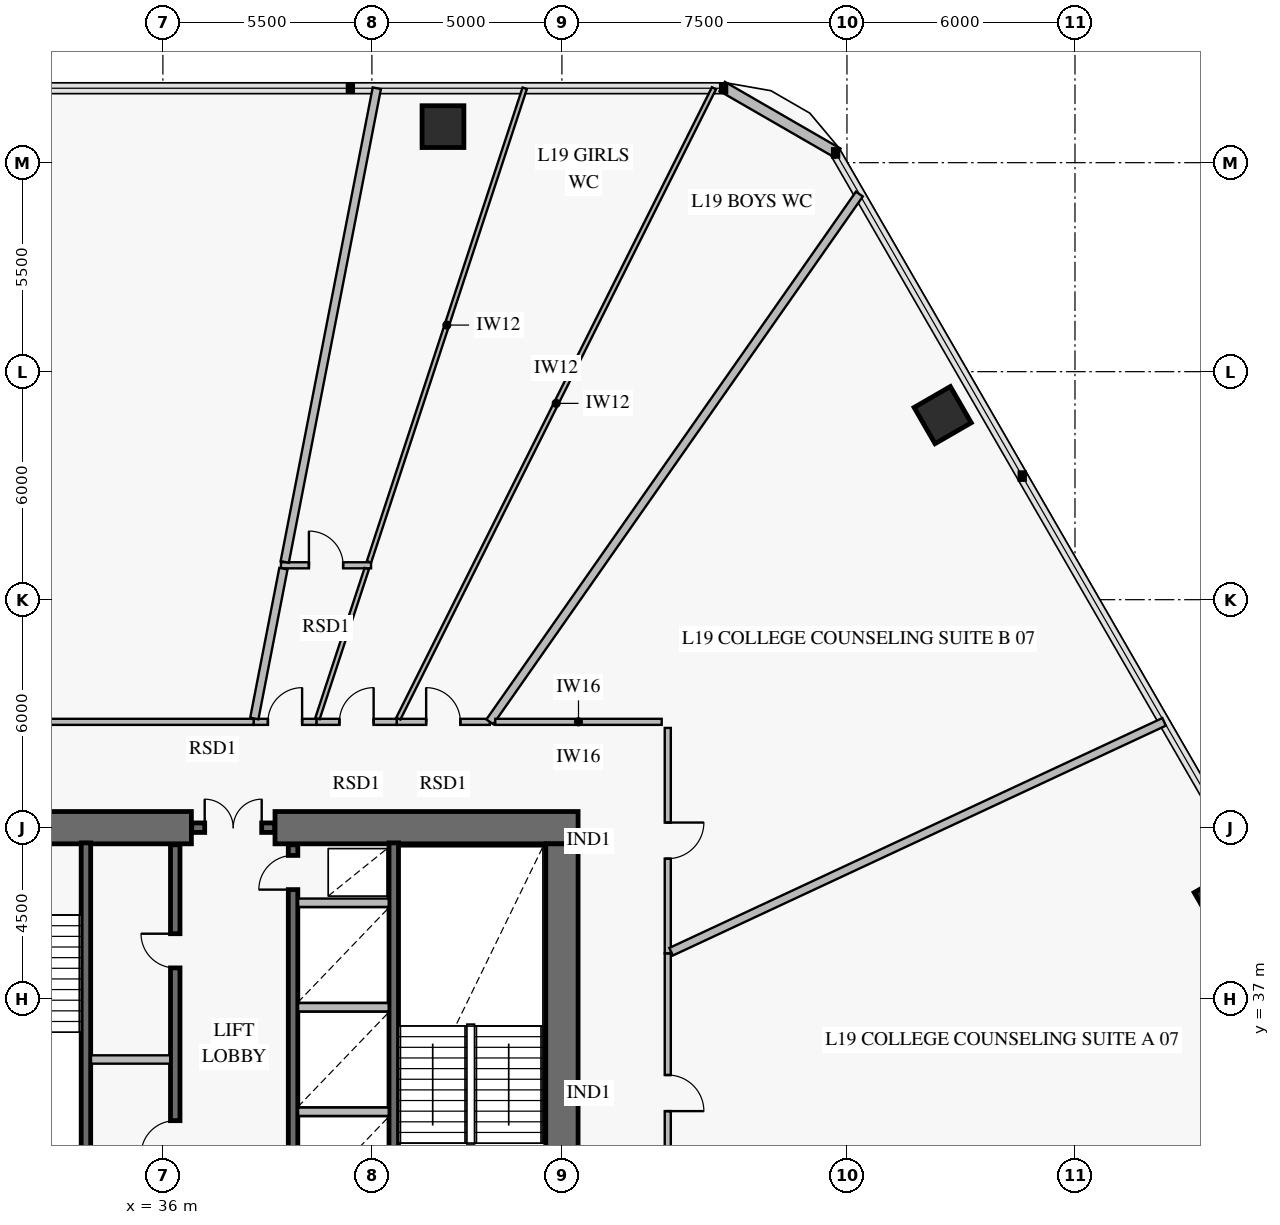
"""IFC4 building model, lengths in metres.
Left out: names, types, materials, properties, quantities, classifications, styles, units other than length and angle.
Written with IfcOpenShell. Run it as: python <this file> out.ifc"""

import sys

from ifc_helpers import new_model, si_unit, direction, frame, frame_2d, origin, origin_2d, place, context, subcontext, project, spatial, rectangle, extrude, element, fill, save


model = new_model("IFC4")
c1 = context("Model", 3, precision=1e-05, world=origin(), true_north=direction((0.0, 1.0)))
c2 = subcontext(c1, "Body", "Model", "MODEL_VIEW")
j1 = project(units=[si_unit("LENGTHUNIT", "METRE"), si_unit("PLANEANGLEUNIT", "RADIAN")], contexts=[c1])
p1 = place(None, origin())
s1 = spatial("IfcSite", under=j1, at=p1, CompositionType="ELEMENT")
p2 = place(p1, origin())
s2 = spatial("IfcBuilding", under=s1, at=p2, CompositionType="ELEMENT")
p3 = place(p2, frame((0.0, 0.0, 79.2)))
s3 = spatial("IfcBuildingStorey", under=s2, at=p3, CompositionType="ELEMENT", Elevation=79.2)
p4 = place(p3, frame((46.925, 41.5, 0.0), z_axis=(0.0, 0.0, 1.0), x_axis=(-1.0, 0.0, 0.0)))
e1 = element("IfcWall", 1, at=p4, inside=s3, PredefinedType="SHEAR", context=c2, shape_type="SweptSolid", body=[
    extrude(rectangle(XDim=7.975, YDim=0.85, at=frame_2d((3.988, 0.0))), origin(), (0.0, 0.0, 1.0), 4.2),
])
p5 = place(p3, frame((36.75, 41.5, 0.0), z_axis=(0.0, 0.0, 1.0), x_axis=(-1.0, 0.0, 0.0)))
e2 = element("IfcWall", 2, at=p5, inside=s3, PredefinedType="SHEAR", context=c2, shape_type="SweptSolid", body=[
    extrude(rectangle(XDim=11.675, YDim=0.85, at=frame_2d((5.837, 0.0))), origin(), (0.0, 0.0, 1.0), 4.2),
])
p6 = place(p5, frame((4.25, 0.0, 0.0)))
e3 = element("IfcOpeningElement", 3, at=p6, cuts=e2, PredefinedType="OPENING", context=c2, shape_type="SweptSolid", body=[
    extrude(rectangle(XDim=1.1, YDim=2.15, at=frame_2d((0.55, 1.075))), frame((0.0, 0.437, 0.0), z_axis=(0.0, -1.0, 0.0), x_axis=(1.0, 0.0, 0.0)), (0.0, 0.0, 1.0), 0.874),
])
p7 = place(p3, frame((46.5, 22.925, 0.0), z_axis=(0.0, 0.0, 1.0), x_axis=(0.0, 1.0, 0.0)))
e4 = element("IfcWall", 4, at=p7, inside=s3, PredefinedType="SHEAR", context=c2, shape_type="SweptSolid", body=[
    extrude(rectangle(XDim=18.15, YDim=0.85, at=frame_2d((9.075, 0.0))), origin(), (0.0, 0.0, 1.0), 4.2),
])
p8 = place(p7, frame((8.825, 0.0, 0.0)))
e5 = element("IfcOpeningElement", 5, at=p8, cuts=e4, PredefinedType="OPENING", context=c2, shape_type="SweptSolid", body=[
    extrude(rectangle(XDim=1.1, YDim=2.15, at=frame_2d((0.55, 1.075))), frame((0.0, 0.437, 0.0), z_axis=(0.0, -1.0, 0.0), x_axis=(1.0, 0.0, 0.0)), (0.0, 0.0, 1.0), 0.874),
])
for number, where, z_axis, x_axis in (
    (6, (63.889, 39.592, 0.0), (0.0, 0.0, 1.0), (-0.5, 0.866, 0.0)),
    (7, (56.519, 52.357, 0.0), (0.0, 0.0, 1.0), (-0.5, 0.866, 0.0)),
    (8, (43.37, 59.948, 0.0), (0.0, 0.0, 1.0), (-1.0, 0.0, 0.0)),
):
    element("IfcColumn", number, at=place(p3, frame(where, z_axis=z_axis, x_axis=x_axis)), inside=s3, PredefinedType="COLUMN", context=c2, shape_type="SweptSolid", body=[
        extrude(rectangle(XDim=1.1, YDim=1.1, at=origin_2d()), origin(), (0.0, 0.0, 1.0), 3.92),
    ])
p9 = place(p3, frame((50.717, 61.006, 0.0), z_axis=(0.0, 0.0, 1.0), x_axis=(0.866007452331, -0.500031091541, 0.0)))
e9 = element("IfcWall", 9, at=p9, inside=s3, PredefinedType="SOLIDWALL", context=c2, shape_type="SweptSolid", body=[
    extrude(rectangle(XDim=3.515, YDim=0.28, at=frame_2d((1.757, 0.0))), origin(), (0.0, 0.0, 1.0), 3.92),
])
p10 = place(p3, frame((36.76, 41.5, 0.0), z_axis=(0.0, 0.0, 1.0), x_axis=(1.0, 0.0, 0.0)))
e10 = element("IfcWall", 10, at=p10, inside=s3, PredefinedType="SOLIDWALL", context=c2, shape_type="SweptSolid", body=[
    extrude(rectangle(XDim=2.18, YDim=0.25, at=frame_2d((1.09, 0.0))), origin(), (0.0, 0.0, 1.0), 4.2),
])
p11 = place(p10, frame((0.34, 0.0, 0.0)))
e11 = element("IfcOpeningElement", 11, at=p11, cuts=e10, PredefinedType="OPENING", context=c2, shape_type="SweptSolid", body=[
    extrude(rectangle(XDim=1.5, YDim=2.15, at=frame_2d((0.75, 1.075))), frame((0.0, 0.137, 0.0), z_axis=(0.0, -1.0, 0.0), x_axis=(1.0, 0.0, 0.0)), (0.0, 0.0, 1.0), 0.274),
])
for number, where, z_axis, x_axis in (
    (12, (33.975, 31.4, 0.0), (0.0, 0.0, 1.0), (0.0, 1.0, 0.0)),
    (13, (42.075, 31.4, 0.0), (0.0, 0.0, 1.0), (0.0, 1.0, 0.0)),
):
    element("IfcWall", number, at=place(p3, frame(where, z_axis=z_axis, x_axis=x_axis)), inside=s3, PredefinedType="SOLIDWALL", context=c2, shape_type="SweptSolid", body=[
        extrude(rectangle(XDim=9.7, YDim=0.25, at=frame_2d((4.85, 0.0))), origin(), (0.0, 0.0, 1.0), 4.2),
    ])
p12 = place(p3, frame((36.325, 31.4, 0.0), z_axis=(0.0, 0.0, 1.0), x_axis=(0.0, 1.0, 0.0)))
e14 = element("IfcWall", 14, at=p12, inside=s3, PredefinedType="SOLIDWALL", context=c2, shape_type="SweptSolid", body=[
    extrude(rectangle(XDim=9.65, YDim=0.25, at=frame_2d((4.825, 0.0))), origin(), (0.0, 0.0, 1.0), 4.2),
])
p13 = place(p12, frame((1.49, 0.0, 0.0)))
e15 = element("IfcOpeningElement", 15, at=p13, cuts=e14, PredefinedType="OPENING", context=c2, shape_type="SweptSolid", body=[
    extrude(rectangle(XDim=0.9, YDim=2.1, at=frame_2d((0.45, 1.05))), frame((0.0, 0.137, 0.0), z_axis=(0.0, -1.0, 0.0), x_axis=(1.0, 0.0, 0.0)), (0.0, 0.0, 1.0), 0.274),
])
p14 = place(p12, frame((6.41, 0.0, 0.0)))
e16 = element("IfcOpeningElement", 16, at=p14, cuts=e14, PredefinedType="OPENING", context=c2, shape_type="SweptSolid", body=[
    extrude(rectangle(XDim=0.9, YDim=2.1, at=frame_2d((0.45, 1.05))), frame((0.0, 0.137, 0.0), z_axis=(0.0, -1.0, 0.0), x_axis=(1.0, 0.0, 0.0)), (0.0, 0.0, 1.0), 0.274),
])
p15 = place(p3, frame((39.425, 31.4, 0.0), z_axis=(0.0, 0.0, 1.0), x_axis=(0.0, 1.0, 0.0)))
e17 = element("IfcWall", 17, at=p15, inside=s3, PredefinedType="SOLIDWALL", context=c2, shape_type="SweptSolid", body=[
    extrude(rectangle(XDim=9.65, YDim=0.25, at=frame_2d((4.825, 0.0))), origin(), (0.0, 0.0, 1.0), 4.2),
])
p16 = place(p15, frame((8.47, 0.0, 0.0)))
e18 = element("IfcOpeningElement", 18, at=p16, cuts=e17, PredefinedType="OPENING", context=c2, shape_type="SweptSolid", body=[
    extrude(rectangle(XDim=0.9, YDim=2.1, at=frame_2d((0.45, 1.05))), frame((0.0, 0.137, 0.0), z_axis=(0.0, -1.0, 0.0), x_axis=(1.0, 0.0, 0.0)), (0.0, 0.0, 1.0), 0.274),
])
p17 = place(p3, frame((44.602, 44.285, 0.0), z_axis=(0.0, 0.0, 1.0), x_axis=(-1.0, 0.0, 0.0)))
e19 = element("IfcWall", 19, at=p17, inside=s3, PredefinedType="PARTITIONING", context=c2, shape_type="SweptSolid", body=[
    extrude(rectangle(XDim=2.45, YDim=0.16, at=frame_2d((1.225, 0.0))), origin(), (0.0, 0.0, 1.0), 3.92),
])
p18 = place(p17, frame((0.775, 0.0, 0.0)))
e20 = element("IfcOpeningElement", 20, at=p18, cuts=e19, PredefinedType="OPENING", context=c2, shape_type="SweptSolid", body=[
    extrude(rectangle(XDim=0.9, YDim=2.1, at=frame_2d((0.45, 1.05))), frame((0.0, 0.092, 0.0), z_axis=(0.0, -1.0, 0.0), x_axis=(1.0, 0.0, 0.0)), (0.0, 0.0, 1.0), 0.184),
])
p19 = place(p3, frame((42.152, 44.285, 0.0), z_axis=(0.0, 0.0, 1.0), x_axis=(-1.0, 0.0, 0.0)))
e21 = element("IfcWall", 21, at=p19, inside=s3, PredefinedType="PARTITIONING", context=c2, shape_type="SweptSolid", body=[
    extrude(rectangle(XDim=2.113, YDim=0.16, at=frame_2d((1.056, 0.0))), origin(), (0.0, 0.0, 1.0), 3.92),
])
p20 = place(p19, frame((0.606, 0.0, 0.0)))
e22 = element("IfcOpeningElement", 22, at=p20, cuts=e21, PredefinedType="OPENING", context=c2, shape_type="SweptSolid", body=[
    extrude(rectangle(XDim=0.9, YDim=2.1, at=frame_2d((0.45, 1.05))), frame((0.0, 0.092, 0.0), z_axis=(0.0, -1.0, 0.0), x_axis=(1.0, 0.0, 0.0)), (0.0, 0.0, 1.0), 0.184),
])
p21 = place(p3, frame((39.107, 48.405, 0.0), z_axis=(0.0, 0.0, 1.0), x_axis=(1.0, 0.0, 0.0)))
e23 = element("IfcWall", 23, at=p21, inside=s3, PredefinedType="PARTITIONING", context=c2, shape_type="SweptSolid", body=[
    extrude(rectangle(XDim=2.37, YDim=0.16, at=frame_2d((1.185, 0.0))), origin(), (0.0, 0.0, 1.0), 3.22),
])
p22 = place(p21, frame((0.735, 0.0, 0.0)))
e24 = element("IfcOpeningElement", 24, at=p22, cuts=e23, PredefinedType="OPENING", context=c2, shape_type="SweptSolid", body=[
    extrude(rectangle(XDim=0.9, YDim=2.1, at=frame_2d((0.45, 1.05))), frame((0.0, 0.092, 0.0), z_axis=(0.0, -1.0, 0.0), x_axis=(1.0, 0.0, 0.0)), (0.0, 0.0, 1.0), 0.184),
])
p23 = place(p3, frame((40.039, 44.285, 0.0), z_axis=(0.0, 0.0, 1.0), x_axis=(-1.0, 0.0, 0.0)))
e25 = element("IfcWall", 25, at=p23, inside=s3, PredefinedType="PARTITIONING", context=c2, shape_type="SweptSolid", body=[
    extrude(rectangle(XDim=1.651, YDim=0.16, at=frame_2d((0.826, 0.0))), origin(), (0.0, 0.0, 1.0), 3.22),
])
p24 = place(p23, frame((0.375, 0.0, 0.0)))
e26 = element("IfcOpeningElement", 26, at=p24, cuts=e25, PredefinedType="OPENING", context=c2, shape_type="SweptSolid", body=[
    extrude(rectangle(XDim=0.9, YDim=2.1, at=frame_2d((0.45, 1.05))), frame((0.0, 0.092, 0.0), z_axis=(0.0, -1.0, 0.0), x_axis=(1.0, 0.0, 0.0)), (0.0, 0.0, 1.0), 0.184),
])
p25 = place(p3, frame((38.388, 44.285, 0.0), z_axis=(0.0, 0.0, 1.0), x_axis=(-1.0, 0.0, 0.0)))
e27 = element("IfcWall", 27, at=p25, inside=s3, PredefinedType="PARTITIONING", context=c2, shape_type="SweptSolid", body=[
    extrude(rectangle(XDim=13.844, YDim=0.16, at=frame_2d((6.922, 0.0))), origin(), (0.0, 0.0, 1.0), 3.22),
])
p26 = place(p25, frame((6.347, 0.0, 0.0)))
e28 = element("IfcOpeningElement", 28, at=p26, cuts=e27, PredefinedType="OPENING", context=c2, shape_type="SweptSolid", body=[
    extrude(rectangle(XDim=1.15, YDim=2.2, at=frame_2d((0.575, 1.1))), frame((0.0, 0.092, 0.0), z_axis=(0.0, -1.0, 0.0), x_axis=(1.0, 0.0, 0.0)), (0.0, 0.0, 1.0), 0.184),
])
p27 = place(p3, frame((49.285, 30.838, 0.0), z_axis=(0.0, 0.0, 1.0), x_axis=(0.0, 1.0, 0.0)))
e29 = element("IfcWall", 29, at=p27, inside=s3, PredefinedType="PARTITIONING", context=c2, shape_type="SweptSolid", body=[
    extrude(rectangle(XDim=7.357, YDim=0.16, at=frame_2d((3.679, 0.0))), origin(), (0.0, 0.0, 1.0), 3.22),
])
p28 = place(p27, frame((3.204, 0.0, 0.0)))
e30 = element("IfcOpeningElement", 30, at=p28, cuts=e29, PredefinedType="OPENING", context=c2, shape_type="SweptSolid", body=[
    extrude(rectangle(XDim=0.95, YDim=2.1, at=frame_2d((0.475, 1.05))), frame((0.0, 0.092, 0.0), z_axis=(0.0, -1.0, 0.0), x_axis=(1.0, 0.0, 0.0)), (0.0, 0.0, 1.0), 0.184),
])
p29 = place(p3, frame((49.285, 38.195, 0.0), z_axis=(0.0, 0.0, 1.0), x_axis=(0.0, 1.0, 0.0)))
e31 = element("IfcWall", 31, at=p29, inside=s3, PredefinedType="PARTITIONING", context=c2, shape_type="SweptSolid", body=[
    extrude(rectangle(XDim=5.93, YDim=0.16, at=frame_2d((2.965, 0.0))), origin(), (0.0, 0.0, 1.0), 3.92),
])
p30 = place(p29, frame((2.49, 0.0, 0.0)))
e32 = element("IfcOpeningElement", 32, at=p30, cuts=e31, PredefinedType="OPENING", context=c2, shape_type="SweptSolid", body=[
    extrude(rectangle(XDim=0.95, YDim=2.1, at=frame_2d((0.475, 1.05))), frame((0.0, 0.092, 0.0), z_axis=(0.0, -1.0, 0.0), x_axis=(1.0, 0.0, 0.0)), (0.0, 0.0, 1.0), 0.184),
])
p31 = place(p3, frame((34.108, 35.4, 0.0), z_axis=(0.0, 0.0, 1.0), x_axis=(1.0, 0.0, 0.0)))
e33 = element("IfcWall", 33, at=p31, inside=s3, PredefinedType="PARTITIONING", context=c2, shape_type="SweptSolid", body=[
    extrude(rectangle(XDim=2.084, YDim=0.22, at=frame_2d((1.042, 0.0))), origin(), (0.0, 0.0, 1.0), 3.92),
])
for number, where, z_axis, x_axis in (
    (34, (39.558, 34.025, 0.0), (0.0, 0.0, 1.0), (1.0, 0.0, 0.0)),
    (35, (39.558, 36.775, 0.0), (0.0, 0.0, 1.0), (1.0, 0.0, 0.0)),
    (36, (39.558, 39.525, 0.0), (0.0, 0.0, 1.0), (1.0, 0.0, 0.0)),
):
    element("IfcWall", number, at=place(p3, frame(where, z_axis=z_axis, x_axis=x_axis)), inside=s3, PredefinedType="PARTITIONING", context=c2, shape_type="SweptSolid", body=[
        extrude(rectangle(XDim=2.384, YDim=0.22, at=frame_2d((1.192, 0.0))), origin(), (0.0, 0.0, 1.0), 3.92),
    ])
p32 = place(p3, frame((44.602, 44.285, 0.0), z_axis=(0.0, 0.0, 1.0), x_axis=(0.573572509316, 0.819154794014, 0.0)))
e37 = element("IfcWall", 37, at=p32, inside=s3, PredefinedType="PARTITIONING", context=c2, shape_type="SweptSolid", body=[
    extrude(rectangle(XDim=16.955, YDim=0.22, at=frame_2d((8.478, 0.0))), origin(), (0.0, 0.0, 1.0), 3.17),
])
p33 = place(p3, frame((42.196, 44.373, 0.0), z_axis=(0.0, 0.0, 1.0), x_axis=(0.447750531228, 0.89415852162, 0.0)))
e38 = element("IfcWall", 38, at=p33, inside=s3, PredefinedType="PARTITIONING", context=c2, shape_type="SweptSolid", body=[
    extrude(rectangle(XDim=18.549, YDim=0.12, at=frame_2d((9.274, 0.0))), origin(), (0.0, 0.0, 1.0), 3.17),
])
p34 = place(p3, frame((40.068, 44.373, 0.0), z_axis=(0.0, 0.0, 1.0), x_axis=(0.312326163944, 0.949974929835, 0.0)))
e39 = element("IfcWall", 39, at=p34, inside=s3, PredefinedType="PARTITIONING", context=c2, shape_type="SweptSolid", body=[
    extrude(rectangle(XDim=4.152, YDim=0.12, at=frame_2d((2.076, 0.0))), origin(), (0.0, 0.0, 1.0), 3.92),
])
p35 = place(p3, frame((41.423, 48.493, 0.0), z_axis=(0.0, 0.0, 1.0), x_axis=(0.312329125199, 0.949973956249, 0.0)))
e40 = element("IfcWall", 40, at=p35, inside=s3, PredefinedType="PARTITIONING", context=c2, shape_type="SweptSolid", body=[
    extrude(rectangle(XDim=13.122, YDim=0.12, at=frame_2d((6.561, 0.0))), origin(), (0.0, 0.0, 1.0), 3.17),
])
p36 = place(p3, frame((38.405, 44.373, 0.0), z_axis=(0.0, 0.0, 1.0), x_axis=(0.190807852756, 0.98162740555, 0.0)))
e41 = element("IfcWall", 41, at=p36, inside=s3, PredefinedType="PARTITIONING", context=c2, shape_type="SweptSolid", body=[
    extrude(rectangle(XDim=4.018, YDim=0.22, at=frame_2d((2.009, 0.0))), origin(), (0.0, 0.0, 1.0), 3.92),
])
p37 = place(p3, frame((39.206, 48.493, 0.0), z_axis=(0.0, 0.0, 1.0), x_axis=(0.190811511044, 0.981626694448, 0.0)))
e42 = element("IfcWall", 42, at=p37, inside=s3, PredefinedType="PARTITIONING", context=c2, shape_type="SweptSolid", body=[
    extrude(rectangle(XDim=12.699, YDim=0.22, at=frame_2d((6.35, 0.0))), origin(), (0.0, 0.0, 1.0), 3.17),
])
p38 = place(p3, frame((49.373, 38.236, 0.0), z_axis=(0.0, 0.0, 1.0), x_axis=(0.906309468756, 0.422614655263, 0.0)))
e43 = element("IfcWall", 43, at=p38, inside=s3, PredefinedType="PARTITIONING", context=c2, shape_type="SweptSolid", body=[
    extrude(rectangle(XDim=14.313, YDim=0.22, at=frame_2d((7.157, 0.0))), origin(), (0.0, 0.0, 1.0), 3.17),
])
p39 = place(p3, frame((49.125, 44.285, 0.0), z_axis=(0.0, 0.0, 1.0), x_axis=(-1.0, 0.0, 0.0)))
e44 = element("IfcWall", 44, at=p39, inside=s3, PredefinedType="PARTITIONING", context=c2, shape_type="SweptSolid", body=[
    extrude(rectangle(XDim=4.379, YDim=0.16, at=frame_2d((2.189, 0.0))), origin(), (0.0, 0.0, 1.0), 3.22),
])
p40 = place(p11, origin())
e45 = element("IfcDoor", 45, at=p40, inside=s3, OperationType="DOUBLE_DOOR_SINGLE_SWING", PredefinedType="DOOR", context=c2, shape_type="SweptSolid", body=[
    extrude(rectangle(XDim=1.5, YDim=2.15, at=frame_2d((0.75, 1.075))), frame((0.0, 0.025, 0.0), z_axis=(0.0, -1.0, 0.0), x_axis=(1.0, 0.0, 0.0)), (0.0, 0.0, 1.0), 0.05),
])
fill(e11, e45)
p41 = place(p13, origin())
e46 = element("IfcDoor", 46, at=p41, inside=s3, OperationType="SINGLE_SWING_LEFT", PredefinedType="DOOR", context=c2, shape_type="SweptSolid", body=[
    extrude(rectangle(XDim=0.9, YDim=2.1, at=frame_2d((0.45, 1.05))), frame((0.0, 0.025, 0.0), z_axis=(0.0, -1.0, 0.0), x_axis=(1.0, 0.0, 0.0)), (0.0, 0.0, 1.0), 0.05),
])
fill(e15, e46)
p42 = place(p14, origin())
e47 = element("IfcDoor", 47, at=p42, inside=s3, OperationType="SINGLE_SWING_RIGHT", PredefinedType="DOOR", context=c2, shape_type="SweptSolid", body=[
    extrude(rectangle(XDim=0.9, YDim=2.1, at=frame_2d((0.45, 1.05))), frame((0.0, 0.025, 0.0), z_axis=(0.0, -1.0, 0.0), x_axis=(1.0, 0.0, 0.0)), (0.0, 0.0, 1.0), 0.05),
])
fill(e16, e47)
p43 = place(p16, origin())
e48 = element("IfcDoor", 48, at=p43, inside=s3, OperationType="SINGLE_SWING_LEFT", PredefinedType="DOOR", context=c2, shape_type="SweptSolid", body=[
    extrude(rectangle(XDim=0.9, YDim=2.1, at=frame_2d((0.45, 1.05))), frame((0.0, 0.025, 0.0), z_axis=(0.0, -1.0, 0.0), x_axis=(1.0, 0.0, 0.0)), (0.0, 0.0, 1.0), 0.05),
])
fill(e18, e48)
p44 = place(p18, frame((0.9, 0.0, 0.0), z_axis=(0.0, 0.0, 1.0), x_axis=(-1.0, 0.0, 0.0)))
e49 = element("IfcDoor", 49, at=p44, inside=s3, OperationType="SINGLE_SWING_LEFT", PredefinedType="DOOR", context=c2, shape_type="SweptSolid", body=[
    extrude(rectangle(XDim=0.9, YDim=2.1, at=frame_2d((0.45, 1.05))), frame((0.0, 0.025, 0.0), z_axis=(0.0, -1.0, 0.0), x_axis=(1.0, 0.0, 0.0)), (0.0, 0.0, 1.0), 0.05),
])
fill(e20, e49)
p45 = place(p20, frame((0.9, 0.0, 0.0), z_axis=(0.0, 0.0, 1.0), x_axis=(-1.0, 0.0, 0.0)))
e50 = element("IfcDoor", 50, at=p45, inside=s3, OperationType="SINGLE_SWING_RIGHT", PredefinedType="DOOR", context=c2, shape_type="SweptSolid", body=[
    extrude(rectangle(XDim=0.9, YDim=2.1, at=frame_2d((0.45, 1.05))), frame((0.0, 0.025, 0.0), z_axis=(0.0, -1.0, 0.0), x_axis=(1.0, 0.0, 0.0)), (0.0, 0.0, 1.0), 0.05),
])
fill(e22, e50)
p46 = place(p22, origin())
e51 = element("IfcDoor", 51, at=p46, inside=s3, OperationType="SINGLE_SWING_LEFT", PredefinedType="DOOR", context=c2, shape_type="SweptSolid", body=[
    extrude(rectangle(XDim=0.9, YDim=2.1, at=frame_2d((0.45, 1.05))), frame((0.0, 0.025, 0.0), z_axis=(0.0, -1.0, 0.0), x_axis=(1.0, 0.0, 0.0)), (0.0, 0.0, 1.0), 0.05),
])
fill(e24, e51)
p47 = place(p24, frame((0.9, 0.0, 0.0), z_axis=(0.0, 0.0, 1.0), x_axis=(-1.0, 0.0, 0.0)))
e52 = element("IfcDoor", 52, at=p47, inside=s3, OperationType="SINGLE_SWING_RIGHT", PredefinedType="DOOR", context=c2, shape_type="SweptSolid", body=[
    extrude(rectangle(XDim=0.9, YDim=2.1, at=frame_2d((0.45, 1.05))), frame((0.0, 0.025, 0.0), z_axis=(0.0, -1.0, 0.0), x_axis=(1.0, 0.0, 0.0)), (0.0, 0.0, 1.0), 0.05),
])
fill(e26, e52)
p48 = place(p28, frame((0.95, 0.0, 0.0), z_axis=(0.0, 0.0, 1.0), x_axis=(-1.0, 0.0, 0.0)))
e53 = element("IfcDoor", 53, at=p48, inside=s3, OperationType="SINGLE_SWING_RIGHT", PredefinedType="DOOR", context=c2, shape_type="SweptSolid", body=[
    extrude(rectangle(XDim=0.95, YDim=2.1, at=frame_2d((0.475, 1.05))), frame((0.0, 0.025, 0.0), z_axis=(0.0, -1.0, 0.0), x_axis=(1.0, 0.0, 0.0)), (0.0, 0.0, 1.0), 0.05),
])
fill(e30, e53)
p49 = place(p30, frame((0.95, 0.0, 0.0), z_axis=(0.0, 0.0, 1.0), x_axis=(-1.0, 0.0, 0.0)))
e54 = element("IfcDoor", 54, at=p49, inside=s3, OperationType="SINGLE_SWING_LEFT", PredefinedType="DOOR", context=c2, shape_type="SweptSolid", body=[
    extrude(rectangle(XDim=0.95, YDim=2.1, at=frame_2d((0.475, 1.05))), frame((0.0, 0.025, 0.0), z_axis=(0.0, -1.0, 0.0), x_axis=(1.0, 0.0, 0.0)), (0.0, 0.0, 1.0), 0.05),
])
fill(e32, e54)
save(model, sys.argv[1])
